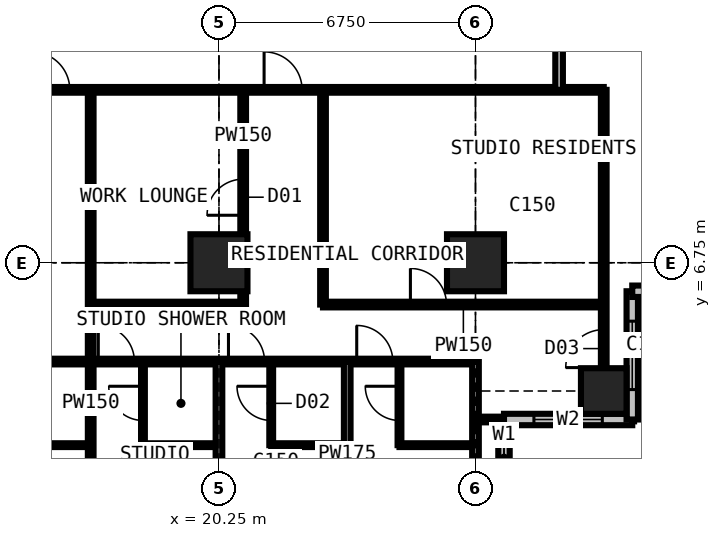
"""IFC4 building model, lengths in metres.
Left out: names, types, materials, properties, quantities, classifications, styles, units other than length and angle.
Written with IfcOpenShell. Run it as: python <this file> out.ifc"""

import sys

from ifc_helpers import new_model, si_unit, direction, frame, frame_2d, origin, origin_2d, place, context, subcontext, project, spatial, rectangle, extrude, element, fill, save


model = new_model("IFC4")
c1 = context("Model", 3, precision=1e-05, world=origin(), true_north=direction((0.0, 1.0)))
c2 = subcontext(c1, "Body", "Model", "MODEL_VIEW")
j1 = project(units=[si_unit("LENGTHUNIT", "METRE"), si_unit("PLANEANGLEUNIT", "RADIAN")], contexts=[c1])
p1 = place(None, origin())
s1 = spatial("IfcSite", under=j1, at=p1, CompositionType="ELEMENT")
p2 = place(p1, origin())
s2 = spatial("IfcBuilding", under=s1, at=p2, CompositionType="ELEMENT")
p3 = place(p2, frame((0.0, 0.0, 160.2)))
s3 = spatial("IfcBuildingStorey", under=s2, at=p3, CompositionType="ELEMENT", Elevation=160.2)
for number, where, z_axis, x_axis in (
    (1, (20.25, 6.75, 0.0), (0.0, 0.0, 1.0), (1.0, 0.0, 0.0)),
    (2, (27.0, 6.75, 0.0), (0.0, 0.0, 1.0), (1.0, 0.0, 0.0)),
):
    element("IfcColumn", number, at=place(p3, frame(where, z_axis=z_axis, x_axis=x_axis)), inside=s3, PredefinedType="COLUMN", context=c2, shape_type="SweptSolid", body=[
        extrude(rectangle(XDim=1.5, YDim=1.5, at=origin_2d()), origin(), (0.0, 0.0, 1.0), 3.6),
    ])
p4 = place(p3, frame((30.375, 3.375, 0.0), z_axis=(0.0, 0.0, 1.0), x_axis=(1.0, 0.0, 0.0)))
e3 = element("IfcColumn", 3, at=p4, inside=s3, PredefinedType="COLUMN", context=c2, shape_type="SweptSolid", body=[
    extrude(rectangle(XDim=1.2, YDim=1.2, at=origin_2d()), origin(), (0.0, 0.0, 1.0), 3.6),
])
p5 = place(p3, frame((27.75, -0.75, 0.0), z_axis=(0.0, 0.0, 1.0), x_axis=(0.0, 1.0, 0.0)))
e4 = element("IfcWall", 4, at=p5, inside=s3, PredefinedType="SOLIDWALL", context=c2, shape_type="SweptSolid", body=[
    extrude(rectangle(XDim=3.375, YDim=0.3, at=frame_2d((1.688, 0.0))), origin(), (0.0, 0.0, 1.0), 3.375),
])
p6 = place(p5, frame((1.607, 0.0, 0.9)))
e5 = element("IfcOpeningElement", 5, at=p6, cuts=e4, PredefinedType="OPENING", context=c2, shape_type="SweptSolid", body=[
    extrude(rectangle(XDim=1.5, YDim=1.8, at=frame_2d((0.75, 0.9))), frame((0.0, 0.16, 0.0), z_axis=(0.0, -1.0, 0.0), x_axis=(1.0, 0.0, 0.0)), (0.0, 0.0, 1.0), 0.32),
])
p7 = place(p3, frame((27.75, 2.625, 0.0), z_axis=(0.0, 0.0, 1.0), x_axis=(1.0, 0.0, 0.0)))
e6 = element("IfcWall", 6, at=p7, inside=s3, PredefinedType="SOLIDWALL", context=c2, shape_type="SweptSolid", body=[
    extrude(rectangle(XDim=3.375, YDim=0.3, at=frame_2d((1.688, 0.0))), origin(), (0.0, 0.0, 1.0), 3.375),
])
p8 = place(p7, frame((0.788, 0.0, 0.6)))
e7 = element("IfcOpeningElement", 7, at=p8, cuts=e6, PredefinedType="OPENING", context=c2, shape_type="SweptSolid", body=[
    extrude(rectangle(XDim=1.8, YDim=2.1, at=frame_2d((0.9, 1.05))), frame((0.0, 0.16, 0.0), z_axis=(0.0, -1.0, 0.0), x_axis=(1.0, 0.0, 0.0)), (0.0, 0.0, 1.0), 0.32),
])
p9 = place(p3, frame((31.125, 2.625, 0.0), z_axis=(0.0, 0.0, 1.0), x_axis=(0.0, 1.0, 0.0)))
e8 = element("IfcWall", 8, at=p9, inside=s3, PredefinedType="SOLIDWALL", context=c2, shape_type="SweptSolid", body=[
    extrude(rectangle(XDim=3.375, YDim=0.3, at=frame_2d((1.688, 0.0))), origin(), (0.0, 0.0, 1.0), 3.375),
])
p10 = place(p9, frame((0.788, 0.0, 0.6)))
e9 = element("IfcOpeningElement", 9, at=p10, cuts=e8, PredefinedType="OPENING", context=c2, shape_type="SweptSolid", body=[
    extrude(rectangle(XDim=1.8, YDim=2.1, at=frame_2d((0.9, 1.05))), frame((0.0, 0.16, 0.0), z_axis=(0.0, -1.0, 0.0), x_axis=(1.0, 0.0, 0.0)), (0.0, 0.0, 1.0), 0.32),
])
p11 = place(p3, frame((31.125, 6.0, 0.0), z_axis=(0.0, 0.0, 1.0), x_axis=(1.0, 0.0, 0.0)))
e10 = element("IfcWall", 10, at=p11, inside=s3, PredefinedType="SOLIDWALL", context=c2, shape_type="SweptSolid", body=[
    extrude(rectangle(XDim=3.375, YDim=0.3, at=frame_2d((1.688, 0.0))), origin(), (0.0, 0.0, 1.0), 3.375),
])
p12 = place(p11, frame((0.268, 0.0, 0.9)))
e11 = element("IfcOpeningElement", 11, at=p12, cuts=e10, PredefinedType="OPENING", context=c2, shape_type="SweptSolid", body=[
    extrude(rectangle(XDim=1.5, YDim=1.8, at=frame_2d((0.75, 0.9))), frame((0.0, 0.16, 0.0), z_axis=(0.0, -1.0, 0.0), x_axis=(1.0, 0.0, 0.0)), (0.0, 0.0, 1.0), 0.32),
])
p13 = place(p3, frame((6.75, 4.15, 0.0), z_axis=(0.0, 0.0, 1.0), x_axis=(1.0, 0.0, 0.0)))
e12 = element("IfcWall", 12, at=p13, inside=s3, PredefinedType="PARTITIONING", context=c2, shape_type="SweptSolid", body=[
    extrude(rectangle(XDim=20.25, YDim=0.15, at=frame_2d((10.125, 0.0))), origin(), (0.0, 0.0, 1.0), 3.375),
])
p14 = place(p13, frame((1.2, 0.0, 0.0)))
e13 = element("IfcOpeningElement", 13, at=p14, cuts=e12, PredefinedType="OPENING", context=c2, shape_type="SweptSolid", body=[
    extrude(rectangle(XDim=1.0, YDim=2.2, at=frame_2d((0.5, 1.1))), frame((0.0, 0.085, 0.0), z_axis=(0.0, -1.0, 0.0), x_axis=(1.0, 0.0, 0.0)), (0.0, 0.0, 1.0), 0.17),
])
p15 = place(p13, frame((3.575, 0.0, 0.0)))
e14 = element("IfcOpeningElement", 14, at=p15, cuts=e12, PredefinedType="OPENING", context=c2, shape_type="SweptSolid", body=[
    extrude(rectangle(XDim=0.95, YDim=2.2, at=frame_2d((0.475, 1.1))), frame((0.0, 0.085, 0.0), z_axis=(0.0, -1.0, 0.0), x_axis=(1.0, 0.0, 0.0)), (0.0, 0.0, 1.0), 0.17),
])
p16 = place(p13, frame((7.0, 0.0, 0.0)))
e15 = element("IfcOpeningElement", 15, at=p16, cuts=e12, PredefinedType="OPENING", context=c2, shape_type="SweptSolid", body=[
    extrude(rectangle(XDim=0.95, YDim=2.2, at=frame_2d((0.475, 1.1))), frame((0.0, 0.085, 0.0), z_axis=(0.0, -1.0, 0.0), x_axis=(1.0, 0.0, 0.0)), (0.0, 0.0, 1.0), 0.17),
])
p17 = place(p13, frame((10.325, 0.0, 0.0)))
e16 = element("IfcOpeningElement", 16, at=p17, cuts=e12, PredefinedType="OPENING", context=c2, shape_type="SweptSolid", body=[
    extrude(rectangle(XDim=0.95, YDim=2.2, at=frame_2d((0.475, 1.1))), frame((0.0, 0.085, 0.0), z_axis=(0.0, -1.0, 0.0), x_axis=(1.0, 0.0, 0.0)), (0.0, 0.0, 1.0), 0.17),
])
p18 = place(p13, frame((13.75, 0.0, 0.0)))
e17 = element("IfcOpeningElement", 17, at=p18, cuts=e12, PredefinedType="OPENING", context=c2, shape_type="SweptSolid", body=[
    extrude(rectangle(XDim=0.95, YDim=2.2, at=frame_2d((0.475, 1.1))), frame((0.0, 0.085, 0.0), z_axis=(0.0, -1.0, 0.0), x_axis=(1.0, 0.0, 0.0)), (0.0, 0.0, 1.0), 0.17),
])
p19 = place(p13, frame((17.125, 0.0, 0.0)))
e18 = element("IfcOpeningElement", 18, at=p19, cuts=e12, PredefinedType="OPENING", context=c2, shape_type="SweptSolid", body=[
    extrude(rectangle(XDim=0.95, YDim=2.2, at=frame_2d((0.475, 1.1))), frame((0.0, 0.085, 0.0), z_axis=(0.0, -1.0, 0.0), x_axis=(1.0, 0.0, 0.0)), (0.0, 0.0, 1.0), 0.17),
])
p20 = place(p3, frame((10.125, 11.3, 0.0), z_axis=(0.0, 0.0, 1.0), x_axis=(1.0, 0.0, 0.0)))
e19 = element("IfcWall", 19, at=p20, inside=s3, PredefinedType="PARTITIONING", context=c2, shape_type="SweptSolid", body=[
    extrude(rectangle(XDim=20.25, YDim=0.15, at=frame_2d((10.125, 0.0))), origin(), (0.0, 0.0, 1.0), 3.375),
])
p21 = place(p20, frame((5.2, 0.0, 0.0)))
e20 = element("IfcOpeningElement", 20, at=p21, cuts=e19, PredefinedType="OPENING", context=c2, shape_type="SweptSolid", body=[
    extrude(rectangle(XDim=1.0, YDim=2.2, at=frame_2d((0.5, 1.1))), frame((0.0, 0.085, 0.0), z_axis=(0.0, -1.0, 0.0), x_axis=(1.0, 0.0, 0.0)), (0.0, 0.0, 1.0), 0.17),
])
p22 = place(p20, frame((11.312, 0.0, 0.0)))
e21 = element("IfcOpeningElement", 21, at=p22, cuts=e19, PredefinedType="OPENING", context=c2, shape_type="SweptSolid", body=[
    extrude(rectangle(XDim=1.0, YDim=2.2, at=frame_2d((0.5, 1.1))), frame((0.0, 0.085, 0.0), z_axis=(0.0, -1.0, 0.0), x_axis=(1.0, 0.0, 0.0)), (0.0, 0.0, 1.0), 0.17),
])
p23 = place(p20, frame((3.325, 0.0, 0.0)))
e22 = element("IfcOpeningElement", 22, at=p23, cuts=e19, PredefinedType="OPENING", context=c2, shape_type="SweptSolid", body=[
    extrude(rectangle(XDim=0.95, YDim=2.2, at=frame_2d((0.475, 1.1))), frame((0.0, 0.085, 0.0), z_axis=(0.0, -1.0, 0.0), x_axis=(1.0, 0.0, 0.0)), (0.0, 0.0, 1.0), 0.17),
])
p24 = place(p3, frame((14.875, 1.95, 0.0), z_axis=(0.0, 0.0, 1.0), x_axis=(1.0, 0.0, 0.0)))
e23 = element("IfcWall", 23, at=p24, inside=s3, PredefinedType="PARTITIONING", context=c2, shape_type="SweptSolid", body=[
    extrude(rectangle(XDim=2.0, YDim=0.1, at=frame_2d((1.0, 0.0))), origin(), (0.0, 0.0, 1.0), 3.375),
])
p25 = place(p3, frame((16.875, -0.734, 0.0), z_axis=(0.0, 0.0, 1.0), x_axis=(0.0, 1.0, 0.0)))
e24 = element("IfcWall", 24, at=p25, inside=s3, PredefinedType="PARTITIONING", context=c2, shape_type="SweptSolid", body=[
    extrude(rectangle(XDim=12.034, YDim=0.15, at=frame_2d((6.017, 0.0))), origin(), (0.0, 0.0, 1.0), 3.375),
])
p26 = place(p3, frame((16.875, 5.65, 0.0), z_axis=(0.0, 0.0, 1.0), x_axis=(1.0, 0.0, 0.0)))
e25 = element("IfcWall", 25, at=p26, inside=s3, PredefinedType="PARTITIONING", context=c2, shape_type="SweptSolid", body=[
    extrude(rectangle(XDim=4.012, YDim=0.15, at=frame_2d((2.006, 0.0))), origin(), (0.0, 0.0, 1.0), 3.375),
])
p27 = place(p3, frame((18.25, 1.95, 0.0), z_axis=(0.0, 0.0, 1.0), x_axis=(0.0, 1.0, 0.0)))
e26 = element("IfcWall", 26, at=p27, inside=s3, PredefinedType="PARTITIONING", context=c2, shape_type="SweptSolid", body=[
    extrude(rectangle(XDim=2.2, YDim=0.1, at=frame_2d((1.1, 0.0))), origin(), (0.0, 0.0, 1.0), 3.375),
])
p28 = place(p27, frame((0.65, 0.0, 0.0)))
e27 = element("IfcOpeningElement", 27, at=p28, cuts=e26, PredefinedType="OPENING", context=c2, shape_type="SweptSolid", body=[
    extrude(rectangle(XDim=0.9, YDim=2.2, at=frame_2d((0.45, 1.1))), frame((0.0, 0.06, 0.0), z_axis=(0.0, -1.0, 0.0), x_axis=(1.0, 0.0, 0.0)), (0.0, 0.0, 1.0), 0.12),
])
p29 = place(p3, frame((18.25, 1.95, 0.0), z_axis=(0.0, 0.0, 1.0), x_axis=(1.0, 0.0, 0.0)))
e28 = element("IfcWall", 28, at=p29, inside=s3, PredefinedType="PARTITIONING", context=c2, shape_type="SweptSolid", body=[
    extrude(rectangle(XDim=2.0, YDim=0.1, at=frame_2d((1.0, 0.0))), origin(), (0.0, 0.0, 1.0), 3.375),
])
p30 = place(p3, frame((20.25, -0.734, 0.0), z_axis=(0.0, 0.0, 1.0), x_axis=(0.0, 1.0, 0.0)))
e29 = element("IfcWall", 29, at=p30, inside=s3, PredefinedType="PARTITIONING", context=c2, shape_type="SweptSolid", body=[
    extrude(rectangle(XDim=4.884, YDim=0.175, at=frame_2d((2.442, 0.0))), origin(), (0.0, 0.0, 1.0), 2.61),
])
p31 = place(p3, frame((20.887, 5.65, 0.0), z_axis=(0.0, 0.0, 1.0), x_axis=(0.0, 1.0, 0.0)))
e30 = element("IfcWall", 30, at=p31, inside=s3, PredefinedType="PARTITIONING", context=c2, shape_type="SweptSolid", body=[
    extrude(rectangle(XDim=5.65, YDim=0.15, at=frame_2d((2.825, 0.0))), origin(), (0.0, 0.0, 1.0), 3.375),
])
p32 = place(p31, frame((2.35, 0.0, 0.0)))
e31 = element("IfcOpeningElement", 31, at=p32, cuts=e30, PredefinedType="OPENING", context=c2, shape_type="SweptSolid", body=[
    extrude(rectangle(XDim=0.95, YDim=2.2, at=frame_2d((0.475, 1.1))), frame((0.0, 0.085, 0.0), z_axis=(0.0, -1.0, 0.0), x_axis=(1.0, 0.0, 0.0)), (0.0, 0.0, 1.0), 0.17),
])
p33 = place(p3, frame((21.625, 1.95, 0.0), z_axis=(0.0, 0.0, 1.0), x_axis=(0.0, 1.0, 0.0)))
e32 = element("IfcWall", 32, at=p33, inside=s3, PredefinedType="PARTITIONING", context=c2, shape_type="SweptSolid", body=[
    extrude(rectangle(XDim=2.2, YDim=0.1, at=frame_2d((1.1, 0.0))), origin(), (0.0, 0.0, 1.0), 3.375),
])
p34 = place(p33, frame((0.65, 0.0, 0.0)))
e33 = element("IfcOpeningElement", 33, at=p34, cuts=e32, PredefinedType="OPENING", context=c2, shape_type="SweptSolid", body=[
    extrude(rectangle(XDim=0.9, YDim=2.2, at=frame_2d((0.45, 1.1))), frame((0.0, 0.06, 0.0), z_axis=(0.0, -1.0, 0.0), x_axis=(1.0, 0.0, 0.0)), (0.0, 0.0, 1.0), 0.12),
])
p35 = place(p3, frame((21.625, 1.95, 0.0), z_axis=(0.0, 0.0, 1.0), x_axis=(1.0, 0.0, 0.0)))
e34 = element("IfcWall", 34, at=p35, inside=s3, PredefinedType="PARTITIONING", context=c2, shape_type="SweptSolid", body=[
    extrude(rectangle(XDim=2.0, YDim=0.1, at=frame_2d((1.0, 0.0))), origin(), (0.0, 0.0, 1.0), 3.375),
])
p36 = place(p3, frame((22.988, 5.65, 0.0), z_axis=(0.0, 0.0, 1.0), x_axis=(1.0, 0.0, 0.0)))
e35 = element("IfcWall", 35, at=p36, inside=s3, PredefinedType="PARTITIONING", context=c2, shape_type="SweptSolid", body=[
    extrude(rectangle(XDim=7.387, YDim=0.15, at=frame_2d((3.694, 0.0))), origin(), (0.0, 0.0, 1.0), 3.375),
])
p37 = place(p36, frame((2.3, 0.0, 0.0)))
e36 = element("IfcOpeningElement", 36, at=p37, cuts=e35, PredefinedType="OPENING", context=c2, shape_type="SweptSolid", body=[
    extrude(rectangle(XDim=0.95, YDim=2.2, at=frame_2d((0.475, 1.1))), frame((0.0, 0.085, 0.0), z_axis=(0.0, -1.0, 0.0), x_axis=(1.0, 0.0, 0.0)), (0.0, 0.0, 1.0), 0.17),
])
p38 = place(p3, frame((22.988, 5.65, 0.0), z_axis=(0.0, 0.0, 1.0), x_axis=(0.0, 1.0, 0.0)))
e37 = element("IfcWall", 37, at=p38, inside=s3, PredefinedType="PARTITIONING", context=c2, shape_type="SweptSolid", body=[
    extrude(rectangle(XDim=5.65, YDim=0.15, at=frame_2d((2.825, 0.0))), origin(), (0.0, 0.0, 1.0), 3.375),
])
p39 = place(p3, frame((23.625, -0.734, 0.0), z_axis=(0.0, 0.0, 1.0), x_axis=(0.0, 1.0, 0.0)))
e38 = element("IfcWall", 38, at=p39, inside=s3, PredefinedType="PARTITIONING", context=c2, shape_type="SweptSolid", body=[
    extrude(rectangle(XDim=4.884, YDim=0.175, at=frame_2d((2.442, 0.0))), origin(), (0.0, 0.0, 1.0), 3.375),
])
p40 = place(p3, frame((25.0, 1.95, 0.0), z_axis=(0.0, 0.0, 1.0), x_axis=(0.0, 1.0, 0.0)))
e39 = element("IfcWall", 39, at=p40, inside=s3, PredefinedType="PARTITIONING", context=c2, shape_type="SweptSolid", body=[
    extrude(rectangle(XDim=2.2, YDim=0.1, at=frame_2d((1.1, 0.0))), origin(), (0.0, 0.0, 1.0), 3.375),
])
p41 = place(p40, frame((0.65, 0.0, 0.0)))
e40 = element("IfcOpeningElement", 40, at=p41, cuts=e39, PredefinedType="OPENING", context=c2, shape_type="SweptSolid", body=[
    extrude(rectangle(XDim=0.9, YDim=2.2, at=frame_2d((0.45, 1.1))), frame((0.0, 0.06, 0.0), z_axis=(0.0, -1.0, 0.0), x_axis=(1.0, 0.0, 0.0)), (0.0, 0.0, 1.0), 0.12),
])
p42 = place(p3, frame((25.0, 1.95, 0.0), z_axis=(0.0, 0.0, 1.0), x_axis=(1.0, 0.0, 0.0)))
e41 = element("IfcWall", 41, at=p42, inside=s3, PredefinedType="PARTITIONING", context=c2, shape_type="SweptSolid", body=[
    extrude(rectangle(XDim=2.0, YDim=0.1, at=frame_2d((1.0, 0.0))), origin(), (0.0, 0.0, 1.0), 3.375),
])
p43 = place(p3, frame((27.0, -0.734, 0.0), z_axis=(0.0, 0.0, 1.0), x_axis=(0.0, 1.0, 0.0)))
e42 = element("IfcWall", 42, at=p43, inside=s3, PredefinedType="PARTITIONING", context=c2, shape_type="SweptSolid", body=[
    extrude(rectangle(XDim=4.884, YDim=0.175, at=frame_2d((2.442, 0.0))), origin(), (0.0, 0.0, 1.0), 2.877),
])
p44 = place(p3, frame((27.0, 2.625, 0.0), z_axis=(0.0, 0.0, 1.0), x_axis=(1.0, 0.0, 0.0)))
e43 = element("IfcWall", 43, at=p44, inside=s3, PredefinedType="PARTITIONING", context=c2, shape_type="SweptSolid", body=[
    extrude(rectangle(XDim=0.734, YDim=0.15, at=frame_2d((0.367, 0.0))), origin(), (0.0, 0.0, 1.0), 3.375),
])
p45 = place(p3, frame((29.2, 11.3, 0.0), z_axis=(0.0, 0.0, 1.0), x_axis=(0.0, 1.0, 0.0)))
e44 = element("IfcWall", 44, at=p45, inside=s3, PredefinedType="PARTITIONING", context=c2, shape_type="SweptSolid", body=[
    extrude(rectangle(XDim=17.9, YDim=0.2, at=frame_2d((8.95, 0.0))), origin(), (0.0, 0.0, 1.0), 3.375),
])
p46 = place(p45, frame((10.55, 0.0, 0.0)))
e45 = element("IfcOpeningElement", 45, at=p46, cuts=e44, PredefinedType="OPENING", context=c2, shape_type="SweptSolid", body=[
    extrude(rectangle(XDim=0.95, YDim=2.2, at=frame_2d((0.475, 1.1))), frame((0.0, 0.11, 0.0), z_axis=(0.0, -1.0, 0.0), x_axis=(1.0, 0.0, 0.0)), (0.0, 0.0, 1.0), 0.22),
])
p47 = place(p45, frame((5.775, 0.0, 0.0)))
e46 = element("IfcOpeningElement", 46, at=p47, cuts=e44, PredefinedType="OPENING", context=c2, shape_type="SweptSolid", body=[
    extrude(rectangle(XDim=0.95, YDim=2.2, at=frame_2d((0.475, 1.1))), frame((0.0, 0.11, 0.0), z_axis=(0.0, -1.0, 0.0), x_axis=(1.0, 0.0, 0.0)), (0.0, 0.0, 1.0), 0.22),
])
p48 = place(p45, frame((16.3, 0.0, 0.0)))
e47 = element("IfcOpeningElement", 47, at=p48, cuts=e44, PredefinedType="OPENING", context=c2, shape_type="SweptSolid", body=[
    extrude(rectangle(XDim=1.0, YDim=2.2, at=frame_2d((0.5, 1.1))), frame((0.0, 0.11, 0.0), z_axis=(0.0, -1.0, 0.0), x_axis=(1.0, 0.0, 0.0)), (0.0, 0.0, 1.0), 0.22),
])
p49 = place(p3, frame((30.375, 2.775, 0.0), z_axis=(0.0, 0.0, 1.0), x_axis=(0.0, 1.0, 0.0)))
e48 = element("IfcWall", 48, at=p49, inside=s3, PredefinedType="PARTITIONING", context=c2, shape_type="SweptSolid", body=[
    extrude(rectangle(XDim=8.525, YDim=0.15, at=frame_2d((4.263, 0.0))), origin(), (0.0, 0.0, 1.0), 2.877),
])
p50 = place(p49, frame((1.216, 0.0, 0.0)))
e49 = element("IfcOpeningElement", 49, at=p50, cuts=e48, PredefinedType="OPENING", context=c2, shape_type="SweptSolid", body=[
    extrude(rectangle(XDim=1.0, YDim=2.2, at=frame_2d((0.5, 1.1))), frame((0.0, 0.085, 0.0), z_axis=(0.0, -1.0, 0.0), x_axis=(1.0, 0.0, 0.0)), (0.0, 0.0, 1.0), 0.17),
])
p51 = place(p6, origin())
e50 = element("IfcWindow", 50, at=p51, inside=s3, PartitioningType="SINGLE_PANEL", PredefinedType="WINDOW", context=c2, shape_type="SweptSolid", body=[
    extrude(rectangle(XDim=1.5, YDim=1.8, at=frame_2d((0.75, 0.9))), frame((0.0, 0.03, 0.0), z_axis=(0.0, -1.0, 0.0), x_axis=(1.0, 0.0, 0.0)), (0.0, 0.0, 1.0), 0.06),
])
fill(e5, e50)
p52 = place(p8, origin())
e51 = element("IfcWindow", 51, at=p52, inside=s3, PartitioningType="SINGLE_PANEL", PredefinedType="WINDOW", context=c2, shape_type="SweptSolid", body=[
    extrude(rectangle(XDim=1.8, YDim=2.1, at=frame_2d((0.9, 1.05))), frame((0.0, 0.03, 0.0), z_axis=(0.0, -1.0, 0.0), x_axis=(1.0, 0.0, 0.0)), (0.0, 0.0, 1.0), 0.06),
])
fill(e7, e51)
p53 = place(p10, origin())
e52 = element("IfcWindow", 52, at=p53, inside=s3, PartitioningType="SINGLE_PANEL", PredefinedType="WINDOW", context=c2, shape_type="SweptSolid", body=[
    extrude(rectangle(XDim=1.8, YDim=2.1, at=frame_2d((0.9, 1.05))), frame((0.0, 0.03, 0.0), z_axis=(0.0, -1.0, 0.0), x_axis=(1.0, 0.0, 0.0)), (0.0, 0.0, 1.0), 0.06),
])
fill(e9, e52)
p54 = place(p21, origin())
e53 = element("IfcDoor", 53, at=p54, inside=s3, OperationType="SINGLE_SWING_LEFT", PredefinedType="DOOR", context=c2, shape_type="SweptSolid", body=[
    extrude(rectangle(XDim=1.0, YDim=2.2, at=frame_2d((0.5, 1.1))), frame((0.0, 0.025, 0.0), z_axis=(0.0, -1.0, 0.0), x_axis=(1.0, 0.0, 0.0)), (0.0, 0.0, 1.0), 0.05),
])
fill(e20, e53)
p55 = place(p17, origin())
e54 = element("IfcDoor", 54, at=p55, inside=s3, OperationType="SINGLE_SWING_LEFT", PredefinedType="DOOR", context=c2, shape_type="SweptSolid", body=[
    extrude(rectangle(XDim=0.95, YDim=2.2, at=frame_2d((0.475, 1.1))), frame((0.0, 0.025, 0.0), z_axis=(0.0, -1.0, 0.0), x_axis=(1.0, 0.0, 0.0)), (0.0, 0.0, 1.0), 0.05),
])
fill(e16, e54)
p56 = place(p28, origin())
e55 = element("IfcDoor", 55, at=p56, inside=s3, OperationType="SINGLE_SWING_RIGHT", PredefinedType="DOOR", context=c2, shape_type="SweptSolid", body=[
    extrude(rectangle(XDim=0.9, YDim=2.2, at=frame_2d((0.45, 1.1))), frame((0.0, 0.025, 0.0), z_axis=(0.0, -1.0, 0.0), x_axis=(1.0, 0.0, 0.0)), (0.0, 0.0, 1.0), 0.05),
])
fill(e27, e55)
p57 = place(p18, origin())
e56 = element("IfcDoor", 56, at=p57, inside=s3, OperationType="SINGLE_SWING_LEFT", PredefinedType="DOOR", context=c2, shape_type="SweptSolid", body=[
    extrude(rectangle(XDim=0.95, YDim=2.2, at=frame_2d((0.475, 1.1))), frame((0.0, 0.025, 0.0), z_axis=(0.0, -1.0, 0.0), x_axis=(1.0, 0.0, 0.0)), (0.0, 0.0, 1.0), 0.05),
])
fill(e17, e56)
p58 = place(p34, origin())
e57 = element("IfcDoor", 57, at=p58, inside=s3, OperationType="SINGLE_SWING_RIGHT", PredefinedType="DOOR", context=c2, shape_type="SweptSolid", body=[
    extrude(rectangle(XDim=0.9, YDim=2.2, at=frame_2d((0.45, 1.1))), frame((0.0, 0.025, 0.0), z_axis=(0.0, -1.0, 0.0), x_axis=(1.0, 0.0, 0.0)), (0.0, 0.0, 1.0), 0.05),
])
fill(e33, e57)
p59 = place(p19, origin())
e58 = element("IfcDoor", 58, at=p59, inside=s3, OperationType="SINGLE_SWING_LEFT", PredefinedType="DOOR", context=c2, shape_type="SweptSolid", body=[
    extrude(rectangle(XDim=0.95, YDim=2.2, at=frame_2d((0.475, 1.1))), frame((0.0, 0.025, 0.0), z_axis=(0.0, -1.0, 0.0), x_axis=(1.0, 0.0, 0.0)), (0.0, 0.0, 1.0), 0.05),
])
fill(e18, e58)
p60 = place(p41, origin())
e59 = element("IfcDoor", 59, at=p60, inside=s3, OperationType="SINGLE_SWING_RIGHT", PredefinedType="DOOR", context=c2, shape_type="SweptSolid", body=[
    extrude(rectangle(XDim=0.9, YDim=2.2, at=frame_2d((0.45, 1.1))), frame((0.0, 0.025, 0.0), z_axis=(0.0, -1.0, 0.0), x_axis=(1.0, 0.0, 0.0)), (0.0, 0.0, 1.0), 0.05),
])
fill(e40, e59)
p61 = place(p22, origin())
e60 = element("IfcDoor", 60, at=p61, inside=s3, OperationType="SINGLE_SWING_LEFT", PredefinedType="DOOR", context=c2, shape_type="SweptSolid", body=[
    extrude(rectangle(XDim=1.0, YDim=2.2, at=frame_2d((0.5, 1.1))), frame((0.0, 0.025, 0.0), z_axis=(0.0, -1.0, 0.0), x_axis=(1.0, 0.0, 0.0)), (0.0, 0.0, 1.0), 0.05),
])
fill(e21, e60)
p62 = place(p32, origin())
e61 = element("IfcDoor", 61, at=p62, inside=s3, OperationType="SINGLE_SWING_LEFT", PredefinedType="DOOR", context=c2, shape_type="SweptSolid", body=[
    extrude(rectangle(XDim=0.95, YDim=2.2, at=frame_2d((0.475, 1.1))), frame((0.0, 0.025, 0.0), z_axis=(0.0, -1.0, 0.0), x_axis=(1.0, 0.0, 0.0)), (0.0, 0.0, 1.0), 0.05),
])
fill(e31, e61)
p63 = place(p37, origin())
e62 = element("IfcDoor", 62, at=p63, inside=s3, OperationType="SINGLE_SWING_LEFT", PredefinedType="DOOR", context=c2, shape_type="SweptSolid", body=[
    extrude(rectangle(XDim=0.95, YDim=2.2, at=frame_2d((0.475, 1.1))), frame((0.0, 0.025, 0.0), z_axis=(0.0, -1.0, 0.0), x_axis=(1.0, 0.0, 0.0)), (0.0, 0.0, 1.0), 0.05),
])
fill(e36, e62)
p64 = place(p50, origin())
e63 = element("IfcDoor", 63, at=p64, inside=s3, OperationType="SINGLE_SWING_LEFT", PredefinedType="DOOR", context=c2, shape_type="SweptSolid", body=[
    extrude(rectangle(XDim=1.0, YDim=2.2, at=frame_2d((0.5, 1.1))), frame((0.0, 0.025, 0.0), z_axis=(0.0, -1.0, 0.0), x_axis=(1.0, 0.0, 0.0)), (0.0, 0.0, 1.0), 0.05),
])
fill(e49, e63)
save(model, sys.argv[1])
